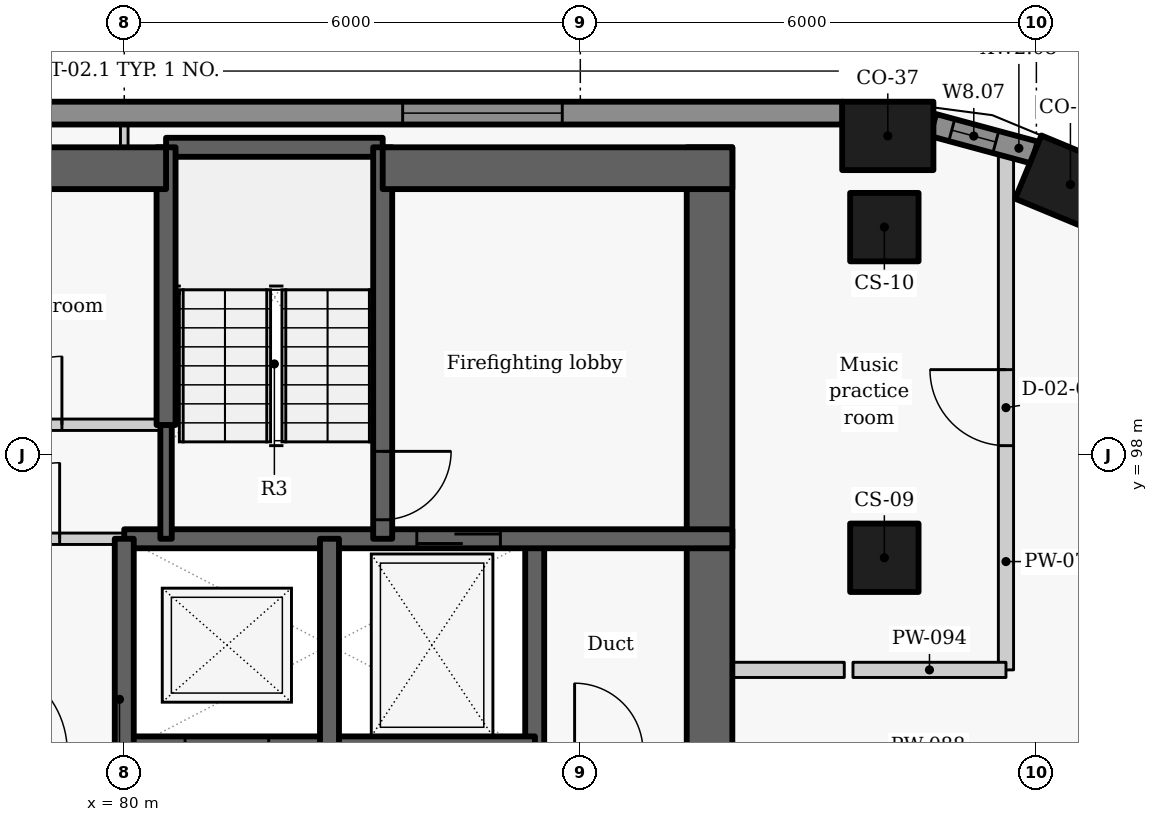
"""IFC4 building model, lengths in metres.
Left out: names, types, materials, properties, quantities, classifications, styles, units other than length and angle.
Written with IfcOpenShell. Run it as: python <this file> out.ifc"""

import sys

from ifc_helpers import new_model, si_unit, direction, frame, frame_2d, origin, origin_2d, place, context, subcontext, project, spatial, rectangle, extrude, element, fill, save


model = new_model("IFC4")
c1 = context("Model", 3, precision=1e-05, world=origin(), true_north=direction((0.0, 1.0)))
c2 = subcontext(c1, "Body", "Model", "MODEL_VIEW")
j1 = project(units=[si_unit("LENGTHUNIT", "METRE"), si_unit("PLANEANGLEUNIT", "RADIAN")], contexts=[c1])
p1 = place(None, origin())
s1 = spatial("IfcSite", under=j1, at=p1, CompositionType="ELEMENT")
p2 = place(p1, origin())
s2 = spatial("IfcBuilding", under=s1, at=p2, CompositionType="ELEMENT")
p3 = place(p2, frame((0.0, 0.0, 183.3)))
s3 = spatial("IfcBuildingStorey", under=s2, at=p3, CompositionType="ELEMENT", Elevation=183.3)
for number, where, z_axis, x_axis in (
    (1, (92.448, 101.56, 0.0), (0.0, 0.0, 1.0), (-0.924, 0.383, 0.0)),
    (2, (90.045, 102.2, 0.0), (0.0, 0.0, 1.0), (-1.0, 0.0, 0.0)),
):
    element("IfcColumn", number, at=place(p3, frame(where, z_axis=z_axis, x_axis=x_axis)), inside=s3, PredefinedType="COLUMN", context=c2, shape_type="SweptSolid", body=[
        extrude(rectangle(XDim=1.2, YDim=0.9, at=origin_2d()), origin(), (0.0, 0.0, 1.0), 3.3),
    ])
for number, where, z_axis, x_axis in (
    (3, (90.0, 96.65, 0.0), (0.0, 0.0, 1.0), (0.0, 1.0, 0.0)),
    (4, (90.0, 101.0, 0.0), (0.0, 0.0, 1.0), (0.0, 1.0, 0.0)),
):
    element("IfcColumn", number, at=place(p3, frame(where, z_axis=z_axis, x_axis=x_axis)), inside=s3, PredefinedType="COLUMN", context=c2, shape_type="SweptSolid", body=[
        extrude(rectangle(XDim=0.9, YDim=0.9, at=origin_2d()), origin(), (0.0, 0.0, 1.0), 3.3),
    ])
p4 = place(p3, frame((91.977, 101.981, 0.0), z_axis=(0.0, 0.0, 1.0), x_axis=(-0.965315341278, 0.261086751661, 0.0)))
e5 = element("IfcWall", 5, at=p4, inside=s3, PredefinedType="SOLIDWALL", context=c2, shape_type="SweptSolid", body=[
    extrude(rectangle(XDim=1.384, YDim=0.3, at=frame_2d((0.692, 0.0))), origin(), (0.0, 0.0, 1.0), 2.425),
])
p5 = place(p4, frame((0.529, 0.0, 0.9)))
e6 = element("IfcOpeningElement", 6, at=p5, cuts=e5, PredefinedType="OPENING", context=c2, shape_type="SweptSolid", body=[
    extrude(rectangle(XDim=0.6, YDim=1.1, at=frame_2d((0.3, 0.55))), frame((0.0, 0.16, 0.0), z_axis=(0.0, -1.0, 0.0), x_axis=(1.0, 0.0, 0.0)), (0.0, 0.0, 1.0), 0.32),
])
p6 = place(p3, frame((89.449, 102.5, 0.0), z_axis=(0.0, 0.0, 1.0), x_axis=(-1.0, 0.0, 0.0)))
e7 = element("IfcWall", 7, at=p6, inside=s3, PredefinedType="SOLIDWALL", context=c2, shape_type="SweptSolid", body=[
    extrude(rectangle(XDim=18.933, YDim=0.3, at=frame_2d((9.466, 0.0))), origin(), (0.0, 0.0, 1.0), 2.425),
])
p7 = place(p6, frame((3.687, 0.0, 0.9)))
e8 = element("IfcOpeningElement", 8, at=p7, cuts=e7, PredefinedType="OPENING", context=c2, shape_type="SweptSolid", body=[
    extrude(rectangle(XDim=2.1, YDim=1.1, at=frame_2d((1.05, 0.55))), frame((0.0, 0.16, 0.0), z_axis=(0.0, -1.0, 0.0), x_axis=(1.0, 0.0, 0.0)), (0.0, 0.0, 1.0), 0.32),
])
p8 = place(p6, frame((13.118, 0.0, 0.9)))
e9 = element("IfcOpeningElement", 9, at=p8, cuts=e7, PredefinedType="OPENING", context=c2, shape_type="SweptSolid", body=[
    extrude(rectangle(XDim=2.1, YDim=1.1, at=frame_2d((1.05, 0.55))), frame((0.0, 0.16, 0.0), z_axis=(0.0, -1.0, 0.0), x_axis=(1.0, 0.0, 0.0)), (0.0, 0.0, 1.0), 0.32),
])
p9 = place(p3, frame((85.4, 94.1, -0.275), z_axis=(0.0, 0.0, 1.0), x_axis=(0.0, 1.0, 0.0)))
e10 = element("IfcWall", 10, at=p9, inside=s3, PredefinedType="SHEAR", context=c2, shape_type="SweptSolid", body=[
    extrude(rectangle(XDim=2.8, YDim=0.25, at=frame_2d((1.4, 0.0))), origin(), (0.0, 0.0, 1.0), 3.3),
])
p10 = place(p3, frame((87.7, 102.05, -0.275), z_axis=(0.0, 0.0, 1.0), x_axis=(0.0, -1.0, 0.0)))
e11 = element("IfcWall", 11, at=p10, inside=s3, PredefinedType="SHEAR", context=c2, shape_type="SweptSolid", body=[
    extrude(rectangle(XDim=14.25, YDim=0.6, at=frame_2d((7.125, 0.0))), origin(), (0.0, 0.0, 1.0), 3.3),
])
p11 = place(p10, frame((8.898, 0.0, 0.275)))
e12 = element("IfcOpeningElement", 12, at=p11, cuts=e11, PredefinedType="OPENING", context=c2, shape_type="SweptSolid", body=[
    extrude(rectangle(XDim=1.5, YDim=2.1, at=frame_2d((0.75, 1.05))), frame((0.0, 0.31, 0.0), z_axis=(0.0, -1.0, 0.0), x_axis=(1.0, 0.0, 0.0)), (0.0, 0.0, 1.0), 0.62),
])
p12 = place(p3, frame((79.997, 94.1, -0.275), z_axis=(0.0, 0.0, 1.0), x_axis=(1.0, 0.0, 0.0)))
e13 = element("IfcWall", 13, at=p12, inside=s3, PredefinedType="SHEAR", context=c2, shape_type="SweptSolid", body=[
    extrude(rectangle(XDim=5.406, YDim=0.4, at=frame_2d((2.703, 0.0))), origin(), (0.0, 0.0, 1.0), 3.3),
])
p13 = place(p12, frame((0.803, 0.0, 0.275)))
e14 = element("IfcOpeningElement", 14, at=p13, cuts=e13, PredefinedType="OPENING", context=c2, shape_type="SweptSolid", body=[
    extrude(rectangle(XDim=1.1, YDim=2.1, at=frame_2d((0.55, 1.05))), frame((0.0, 0.21, 0.0), z_axis=(0.0, -1.0, 0.0), x_axis=(1.0, 0.0, 0.0)), (0.0, 0.0, 1.0), 0.42),
])
p14 = place(p3, frame((80.0, 96.9, -0.275), z_axis=(0.0, 0.0, 1.0), x_axis=(1.0, 0.0, 0.0)))
e15 = element("IfcWall", 15, at=p14, inside=s3, PredefinedType="SHEAR", context=c2, shape_type="SweptSolid", body=[
    extrude(rectangle(XDim=8.0, YDim=0.25, at=frame_2d((4.0, 0.0))), origin(), (0.0, 0.0, 1.0), 3.3),
])
p15 = place(p14, frame((3.849, 0.0, 0.275)))
e16 = element("IfcOpeningElement", 16, at=p15, cuts=e15, PredefinedType="OPENING", context=c2, shape_type="SweptSolid", body=[
    extrude(rectangle(XDim=1.1, YDim=2.1, at=frame_2d((0.55, 1.05))), frame((0.0, 0.135, 0.0), z_axis=(0.0, -1.0, 0.0), x_axis=(1.0, 0.0, 0.0)), (0.0, 0.0, 1.0), 0.27),
])
p16 = place(p3, frame((80.0, 94.1, -0.275), z_axis=(0.0, 0.0, 1.0), x_axis=(0.0, 1.0, 0.0)))
e17 = element("IfcWall", 17, at=p16, inside=s3, PredefinedType="SHEAR", context=c2, shape_type="SweptSolid", body=[
    extrude(rectangle(XDim=2.8, YDim=0.25, at=frame_2d((1.4, 0.0))), origin(), (0.0, 0.0, 1.0), 3.3),
])
p17 = place(p3, frame((77.3, 96.9, 0.0), z_axis=(0.0, 0.0, 1.0), x_axis=(1.0, 0.0, 0.0)))
e18 = element("IfcWall", 18, at=p17, inside=s3, PredefinedType="PARTITIONING", context=c2, shape_type="SweptSolid", body=[
    extrude(rectangle(XDim=2.7, YDim=0.15, at=frame_2d((1.35, 0.0))), origin(), (0.0, 0.0, 1.0), 3.025),
])
p18 = place(p17, frame((0.85, 0.0, 0.0)))
e19 = element("IfcOpeningElement", 19, at=p18, cuts=e18, PredefinedType="OPENING", context=c2, shape_type="SweptSolid", body=[
    extrude(rectangle(XDim=1.0, YDim=2.1, at=frame_2d((0.5, 1.05))), frame((0.0, 0.085, 0.0), z_axis=(0.0, -1.0, 0.0), x_axis=(1.0, 0.0, 0.0)), (0.0, 0.0, 1.0), 0.17),
])
p19 = place(p3, frame((82.7, 94.1, -0.275), z_axis=(0.0, 0.0, 1.0), x_axis=(0.0, 1.0, 0.0)))
e20 = element("IfcWall", 20, at=p19, inside=s3, PredefinedType="SHEAR", context=c2, shape_type="SweptSolid", body=[
    extrude(rectangle(XDim=2.8, YDim=0.25, at=frame_2d((1.4, 0.0))), origin(), (0.0, 0.0, 1.0), 3.3),
])
p20 = place(p3, frame((80.55, 102.05, -0.275), z_axis=(0.0, 0.0, 1.0), x_axis=(1.0, 0.0, 0.0)))
e21 = element("IfcWall", 21, at=p20, inside=s3, PredefinedType="SHEAR", context=c2, shape_type="SweptSolid", body=[
    extrude(rectangle(XDim=2.85, YDim=0.25, at=frame_2d((1.425, 0.0))), origin(), (0.0, 0.0, 1.0), 3.3),
])
p21 = place(p3, frame((83.4, 102.05, -0.275), z_axis=(0.0, 0.0, 1.0), x_axis=(0.0, -1.0, 0.0)))
e22 = element("IfcWall", 22, at=p21, inside=s3, PredefinedType="SHEAR", context=c2, shape_type="SweptSolid", body=[
    extrude(rectangle(XDim=5.15, YDim=0.25, at=frame_2d((2.575, 0.0))), origin(), (0.0, 0.0, 1.0), 3.3),
])
p22 = place(p21, frame((4.0, 0.0, 0.275)))
e23 = element("IfcOpeningElement", 23, at=p22, cuts=e22, PredefinedType="OPENING", context=c2, shape_type="SweptSolid", body=[
    extrude(rectangle(XDim=0.9, YDim=2.1, at=frame_2d((0.45, 1.05))), frame((0.0, 0.135, 0.0), z_axis=(0.0, -1.0, 0.0), x_axis=(1.0, 0.0, 0.0)), (0.0, 0.0, 1.0), 0.27),
])
p23 = place(p3, frame((80.55, 96.9, -0.275), z_axis=(0.0, 0.0, 1.0), x_axis=(0.0, 1.0, 0.0)))
e24 = element("IfcWall", 24, at=p23, inside=s3, PredefinedType="SHEAR", context=c2, shape_type="SweptSolid", body=[
    extrude(rectangle(XDim=1.503, YDim=0.15, at=frame_2d((0.751, 0.0))), origin(), (0.0, 0.0, 1.0), 3.3),
])
p24 = place(p3, frame((80.55, 98.397, -0.275), z_axis=(0.0, 0.0, 1.0), x_axis=(0.0, 1.0, 0.0)))
e25 = element("IfcWall", 25, at=p24, inside=s3, PredefinedType="SHEAR", context=c2, shape_type="SweptSolid", body=[
    extrude(rectangle(XDim=3.653, YDim=0.25, at=frame_2d((1.827, 0.0))), origin(), (0.0, 0.0, 1.0), 3.3),
])
p25 = place(p3, frame((75.35, 101.775, -0.275), z_axis=(0.0, 0.0, 1.0), x_axis=(1.0, 0.0, 0.0)))
e26 = element("IfcWall", 26, at=p25, inside=s3, PredefinedType="SHEAR", context=c2, shape_type="SweptSolid", body=[
    extrude(rectangle(XDim=5.2, YDim=0.55, at=frame_2d((2.6, 0.0))), origin(), (0.0, 0.0, 1.0), 3.3),
])
p26 = place(p3, frame((83.4, 101.775, -0.275), z_axis=(0.0, 0.0, 1.0), x_axis=(1.0, 0.0, 0.0)))
e27 = element("IfcWall", 27, at=p26, inside=s3, PredefinedType="SHEAR", context=c2, shape_type="SweptSolid", body=[
    extrude(rectangle(XDim=4.6, YDim=0.55, at=frame_2d((2.3, 0.0))), origin(), (0.0, 0.0, 1.0), 3.3),
])
p27 = place(p3, frame((75.35, 98.4, 0.0), z_axis=(0.0, 0.0, 1.0), x_axis=(1.0, 0.0, 0.0)))
e28 = element("IfcWall", 28, at=p27, inside=s3, PredefinedType="PARTITIONING", context=c2, shape_type="SweptSolid", body=[
    extrude(rectangle(XDim=5.2, YDim=0.15, at=frame_2d((2.6, 0.0))), origin(), (0.0, 0.0, 1.0), 3.025),
])
p28 = place(p27, frame((0.33, 0.0, 0.0)))
e29 = element("IfcOpeningElement", 29, at=p28, cuts=e28, PredefinedType="OPENING", context=c2, shape_type="SweptSolid", body=[
    extrude(rectangle(XDim=0.9, YDim=2.1, at=frame_2d((0.45, 1.05))), frame((0.0, 0.085, 0.0), z_axis=(0.0, -1.0, 0.0), x_axis=(1.0, 0.0, 0.0)), (0.0, 0.0, 1.0), 0.17),
])
p29 = place(p27, frame((2.93, 0.0, 0.0)))
e30 = element("IfcOpeningElement", 30, at=p29, cuts=e28, PredefinedType="OPENING", context=c2, shape_type="SweptSolid", body=[
    extrude(rectangle(XDim=0.9, YDim=2.1, at=frame_2d((0.45, 1.05))), frame((0.0, 0.085, 0.0), z_axis=(0.0, -1.0, 0.0), x_axis=(1.0, 0.0, 0.0)), (0.0, 0.0, 1.0), 0.17),
])
p30 = place(p3, frame((91.6, 95.175, 0.0), z_axis=(0.0, 0.0, 1.0), x_axis=(0.0, 1.0, 0.0)))
e31 = element("IfcWall", 31, at=p30, inside=s3, PredefinedType="PARTITIONING", context=c2, shape_type="SweptSolid", body=[
    extrude(rectangle(XDim=6.899, YDim=0.2, at=frame_2d((3.449, 0.0))), origin(), (0.0, 0.0, 1.0), 2.405),
])
p31 = place(p30, frame((2.95, 0.0, 0.0)))
e32 = element("IfcOpeningElement", 32, at=p31, cuts=e31, PredefinedType="OPENING", context=c2, shape_type="SweptSolid", body=[
    extrude(rectangle(XDim=1.0, YDim=2.1, at=frame_2d((0.5, 1.05))), frame((0.0, 0.11, 0.0), z_axis=(0.0, -1.0, 0.0), x_axis=(1.0, 0.0, 0.0)), (0.0, 0.0, 1.0), 0.22),
])
p32 = place(p3, frame((88.0, 95.175, 0.0), z_axis=(0.0, 0.0, 1.0), x_axis=(1.0, 0.0, 0.0)))
e33 = element("IfcWall", 33, at=p32, inside=s3, PredefinedType="PARTITIONING", context=c2, shape_type="SweptSolid", body=[
    extrude(rectangle(XDim=1.473, YDim=0.2, at=frame_2d((0.736, 0.0))), origin(), (0.0, 0.0, 1.0), 3.025),
])
p33 = place(p3, frame((89.587, 95.175, 0.0), z_axis=(0.0, 0.0, 1.0), x_axis=(1.0, 0.0, 0.0)))
e34 = element("IfcWall", 34, at=p33, inside=s3, PredefinedType="PARTITIONING", context=c2, shape_type="SweptSolid", body=[
    extrude(rectangle(XDim=2.013, YDim=0.2, at=frame_2d((1.006, 0.0))), origin(), (0.0, 0.0, 1.0), 2.505),
])
p34 = place(p3, frame((80.0, 102.05, 0.0), z_axis=(0.0, 0.0, 1.0), x_axis=(0.0, 1.0, 0.0)))
e35 = element("IfcWall", 35, at=p34, inside=s3, PredefinedType="PARTITIONING", context=c2, shape_type="SweptSolid", body=[
    extrude(rectangle(XDim=0.3, YDim=0.1, at=frame_2d((0.15, 0.0))), origin(), (0.0, 0.0, 1.0), 3.025),
])
p35 = place(p5, origin())
e36 = element("IfcWindow", 36, at=p35, inside=s3, PartitioningType="SINGLE_PANEL", PredefinedType="WINDOW", context=c2, shape_type="SweptSolid", body=[
    extrude(rectangle(XDim=0.6, YDim=1.1, at=frame_2d((0.3, 0.55))), frame((0.0, 0.03, 0.0), z_axis=(0.0, -1.0, 0.0), x_axis=(1.0, 0.0, 0.0)), (0.0, 0.0, 1.0), 0.06),
])
fill(e6, e36)
p36 = place(p7, origin())
e37 = element("IfcWindow", 37, at=p36, inside=s3, PartitioningType="SINGLE_PANEL", PredefinedType="WINDOW", context=c2, shape_type="SweptSolid", body=[
    extrude(rectangle(XDim=2.1, YDim=1.1, at=frame_2d((1.05, 0.55))), frame((0.0, 0.03, 0.0), z_axis=(0.0, -1.0, 0.0), x_axis=(1.0, 0.0, 0.0)), (0.0, 0.0, 1.0), 0.06),
])
fill(e8, e37)
p37 = place(p15, origin())
e38 = element("IfcDoor", 38, at=p37, inside=s3, OperationType="SLIDING_TO_LEFT", PredefinedType="DOOR", context=c2, shape_type="SweptSolid", body=[
    extrude(rectangle(XDim=1.1, YDim=2.1, at=frame_2d((0.55, 1.05))), frame((0.0, 0.025, 0.0), z_axis=(0.0, -1.0, 0.0), x_axis=(1.0, 0.0, 0.0)), (0.0, 0.0, 1.0), 0.05),
])
fill(e16, e38)
p38 = place(p18, origin())
e39 = element("IfcDoor", 39, at=p38, inside=s3, OperationType="SINGLE_SWING_RIGHT", PredefinedType="DOOR", context=c2, shape_type="SweptSolid", body=[
    extrude(rectangle(XDim=1.0, YDim=2.1, at=frame_2d((0.5, 1.05))), frame((0.0, 0.025, 0.0), z_axis=(0.0, -1.0, 0.0), x_axis=(1.0, 0.0, 0.0)), (0.0, 0.0, 1.0), 0.05),
])
fill(e19, e39)
p39 = place(p29, origin())
e40 = element("IfcDoor", 40, at=p39, inside=s3, OperationType="SINGLE_SWING_RIGHT", PredefinedType="DOOR", context=c2, shape_type="SweptSolid", body=[
    extrude(rectangle(XDim=0.9, YDim=2.1, at=frame_2d((0.45, 1.05))), frame((0.0, 0.025, 0.0), z_axis=(0.0, -1.0, 0.0), x_axis=(1.0, 0.0, 0.0)), (0.0, 0.0, 1.0), 0.05),
])
fill(e30, e40)
p40 = place(p22, origin())
e41 = element("IfcDoor", 41, at=p40, inside=s3, OperationType="SINGLE_SWING_LEFT", PredefinedType="DOOR", context=c2, shape_type="SweptSolid", body=[
    extrude(rectangle(XDim=0.9, YDim=2.1, at=frame_2d((0.45, 1.05))), frame((0.0, 0.025, 0.0), z_axis=(0.0, -1.0, 0.0), x_axis=(1.0, 0.0, 0.0)), (0.0, 0.0, 1.0), 0.05),
])
fill(e23, e41)
p41 = place(p31, origin())
e42 = element("IfcDoor", 42, at=p41, inside=s3, OperationType="SINGLE_SWING_RIGHT", PredefinedType="DOOR", context=c2, shape_type="SweptSolid", body=[
    extrude(rectangle(XDim=1.0, YDim=2.1, at=frame_2d((0.5, 1.05))), frame((0.0, 0.025, 0.0), z_axis=(0.0, -1.0, 0.0), x_axis=(1.0, 0.0, 0.0)), (0.0, 0.0, 1.0), 0.05),
])
fill(e32, e42)
save(model, sys.argv[1])
